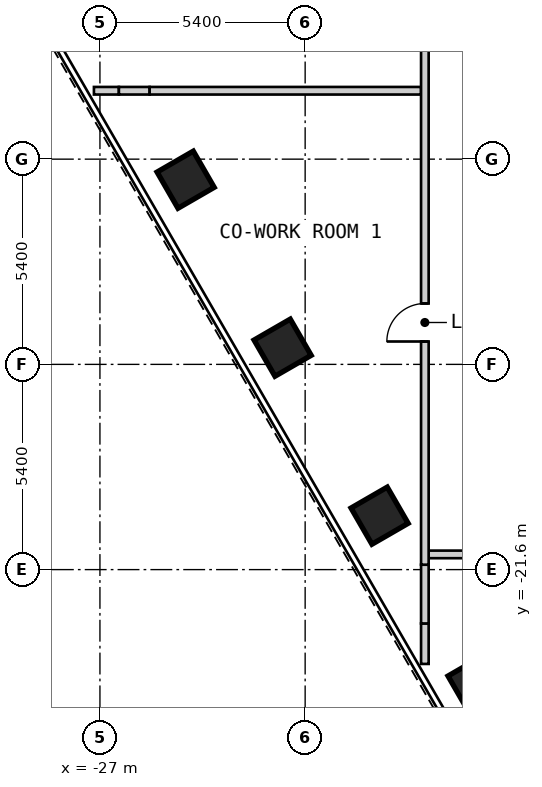
"""IFC4 building model, lengths in metres.
Left out: names, types, materials, properties, quantities, classifications, styles, units other than length and angle.
Written with IfcOpenShell. Run it as: python <this file> out.ifc"""

import sys

from ifc_helpers import new_model, si_unit, direction, frame, frame_2d, origin, origin_2d, place, context, subcontext, project, spatial, rectangle, extrude, element, fill, save


model = new_model("IFC4")
c1 = context("Model", 3, precision=1e-05, world=origin(), true_north=direction((0.0, 1.0)))
c2 = subcontext(c1, "Body", "Model", "MODEL_VIEW")
j1 = project(units=[si_unit("LENGTHUNIT", "METRE"), si_unit("PLANEANGLEUNIT", "RADIAN")], contexts=[c1])
p1 = place(None, origin())
s1 = spatial("IfcSite", under=j1, at=p1, CompositionType="ELEMENT")
p2 = place(p1, origin())
s2 = spatial("IfcBuilding", under=s1, at=p2, CompositionType="ELEMENT")
p3 = place(p2, frame((0.0, 0.0, 9.0)))
s3 = spatial("IfcBuildingStorey", under=s2, at=p3, CompositionType="ELEMENT", Elevation=9.0)
for number, where, z_axis, x_axis in (
    (1, (-24.745, -11.341, 0.0), (0.0, 0.0, 1.0), (0.5, -0.866, 0.0)),
    (2, (-22.193, -15.761, 0.0), (0.0, 0.0, 1.0), (0.5, -0.866, 0.0)),
    (3, (-19.641, -20.181, 0.0), (0.0, 0.0, 1.0), (0.5, -0.866, 0.0)),
    (4, (-17.089, -24.601, 0.0), (0.0, 0.0, 1.0), (0.5, -0.866, 0.0)),
):
    element("IfcColumn", number, at=place(p3, frame(where, z_axis=z_axis, x_axis=x_axis)), inside=s3, PredefinedType="COLUMN", context=c2, shape_type="SweptSolid", body=[
        extrude(rectangle(XDim=1.1, YDim=1.1, at=origin_2d()), origin(), (0.0, 0.0, 1.0), 3.6),
    ])
p4 = place(p3, frame((-18.35, -21.2, 0.0), z_axis=(0.0, 0.0, 1.0), x_axis=(1.0, 0.0, 0.0)))
e5 = element("IfcWall", 5, at=p4, inside=s3, PredefinedType="PARTITIONING", context=c2, shape_type="SweptSolid", body=[
    extrude(rectangle(XDim=24.1, YDim=0.2, at=frame_2d((12.05, 0.0))), origin(), (0.0, 0.0, 1.0), 3.25),
])
p5 = place(p4, frame((2.277, 0.0, 0.0), z_axis=(0.0, 0.0, 1.0), x_axis=(-1.0, 0.0, 0.0)))
e6 = element("IfcOpeningElement", 6, at=p5, cuts=e5, PredefinedType="OPENING", context=c2, shape_type="SweptSolid", body=[
    extrude(rectangle(XDim=0.9, YDim=2.1, at=frame_2d((0.45, 1.05))), frame((0.0, 0.11, 0.0), z_axis=(0.0, -1.0, 0.0), x_axis=(1.0, 0.0, 0.0)), (0.0, 0.0, 1.0), 0.22),
])
p6 = place(p4, frame((6.15, 0.0, 0.0), z_axis=(0.0, 0.0, 1.0), x_axis=(-1.0, 0.0, 0.0)))
e7 = element("IfcOpeningElement", 7, at=p6, cuts=e5, PredefinedType="OPENING", context=c2, shape_type="SweptSolid", body=[
    extrude(rectangle(XDim=1.0, YDim=2.1, at=frame_2d((0.5, 1.05))), frame((0.0, 0.11, 0.0), z_axis=(0.0, -1.0, 0.0), x_axis=(1.0, 0.0, 0.0)), (0.0, 0.0, 1.0), 0.22),
])
p7 = place(p4, frame((14.923, 0.0, 0.0)))
e8 = element("IfcOpeningElement", 8, at=p7, cuts=e5, PredefinedType="OPENING", context=c2, shape_type="SweptSolid", body=[
    extrude(rectangle(XDim=1.8, YDim=2.1, at=frame_2d((0.9, 1.05))), frame((0.0, 0.11, 0.0), z_axis=(0.0, -1.0, 0.0), x_axis=(1.0, 0.0, 0.0)), (0.0, 0.0, 1.0), 0.22),
])
p8 = place(p3, frame((-27.158, -9.0, 0.0), z_axis=(0.0, 0.0, 1.0), x_axis=(1.0, 0.0, 0.0)))
e9 = element("IfcWall", 9, at=p8, inside=s3, PredefinedType="PARTITIONING", context=c2, shape_type="SweptSolid", body=[
    extrude(rectangle(XDim=0.657, YDim=0.2, at=frame_2d((0.329, 0.0))), origin(), (0.0, 0.0, 1.0), 3.25),
])
p9 = place(p3, frame((-26.501, -9.0, 0.0), z_axis=(0.0, 0.0, 1.0), x_axis=(1.0, 0.0, 0.0)))
e10 = element("IfcWall", 10, at=p9, inside=s3, PredefinedType="PARTITIONING", context=c2, shape_type="SweptSolid", body=[
    extrude(rectangle(XDim=0.809, YDim=0.2, at=frame_2d((0.405, 0.0))), origin(), (0.0, 0.0, 1.0), 2.52),
])
p10 = place(p3, frame((-25.692, -9.0, 0.0), z_axis=(0.0, 0.0, 1.0), x_axis=(1.0, 0.0, 0.0)))
e11 = element("IfcWall", 11, at=p10, inside=s3, PredefinedType="PARTITIONING", context=c2, shape_type="SweptSolid", body=[
    extrude(rectangle(XDim=7.142, YDim=0.2, at=frame_2d((3.571, 0.0))), origin(), (0.0, 0.0, 1.0), 3.25),
])
p11 = place(p3, frame((-18.45, -24.082, 0.0), z_axis=(0.0, 0.0, 1.0), x_axis=(0.0, 1.0, 0.0)))
e12 = element("IfcWall", 12, at=p11, inside=s3, PredefinedType="PARTITIONING", context=c2, shape_type="SweptSolid", body=[
    extrude(rectangle(XDim=1.065, YDim=0.2, at=frame_2d((0.532, 0.0))), origin(), (0.0, 0.0, 1.0), 3.25),
])
p12 = place(p3, frame((-18.45, -23.017, 0.0), z_axis=(0.0, 0.0, 1.0), x_axis=(0.0, 1.0, 0.0)))
e13 = element("IfcWall", 13, at=p12, inside=s3, PredefinedType="PARTITIONING", context=c2, shape_type="SweptSolid", body=[
    extrude(rectangle(XDim=1.546, YDim=0.2, at=frame_2d((0.773, 0.0))), origin(), (0.0, 0.0, 1.0), 2.52),
])
p13 = place(p3, frame((-18.45, -21.471, 0.0), z_axis=(0.0, 0.0, 1.0), x_axis=(0.0, 1.0, 0.0)))
e14 = element("IfcWall", 14, at=p13, inside=s3, PredefinedType="PARTITIONING", context=c2, shape_type="SweptSolid", body=[
    extrude(rectangle(XDim=23.371, YDim=0.2, at=frame_2d((11.686, 0.0))), origin(), (0.0, 0.0, 1.0), 3.25),
])
p14 = place(p13, frame((5.873, 0.0, 0.0)))
e15 = element("IfcOpeningElement", 15, at=p14, cuts=e14, PredefinedType="OPENING", context=c2, shape_type="SweptSolid", body=[
    extrude(rectangle(XDim=1.0, YDim=2.1, at=frame_2d((0.5, 1.05))), frame((0.0, 0.11, 0.0), z_axis=(0.0, -1.0, 0.0), x_axis=(1.0, 0.0, 0.0)), (0.0, 0.0, 1.0), 0.22),
])
p15 = place(p13, frame((17.469, 0.0, 0.0)))
e16 = element("IfcOpeningElement", 16, at=p15, cuts=e14, PredefinedType="OPENING", context=c2, shape_type="SweptSolid", body=[
    extrude(rectangle(XDim=1.0, YDim=2.1, at=frame_2d((0.5, 1.05))), frame((0.0, 0.11, 0.0), z_axis=(0.0, -1.0, 0.0), x_axis=(1.0, 0.0, 0.0)), (0.0, 0.0, 1.0), 0.22),
])
p16 = place(p14, origin())
e17 = element("IfcDoor", 17, at=p16, inside=s3, OperationType="SINGLE_SWING_LEFT", PredefinedType="DOOR", context=c2, shape_type="SweptSolid", body=[
    extrude(rectangle(XDim=1.0, YDim=2.1, at=frame_2d((0.5, 1.05))), frame((0.0, 0.025, 0.0), z_axis=(0.0, -1.0, 0.0), x_axis=(1.0, 0.0, 0.0)), (0.0, 0.0, 1.0), 0.05),
])
fill(e15, e17)
save(model, sys.argv[1])
